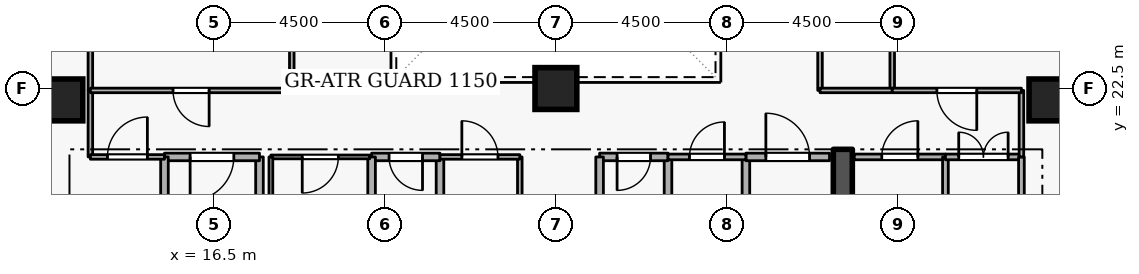
"""IFC4 building model, lengths in metres.
Left out: names, types, materials, properties, quantities, classifications, styles, units other than length and angle.
Written with IfcOpenShell. Run it as: python <this file> out.ifc"""

import sys

from ifc_helpers import new_model, si_unit, direction, frame, frame_2d, origin, origin_2d, place, context, subcontext, project, spatial, rectangle, extrude, element, fill, save


model = new_model("IFC4")
c1 = context("Model", 3, precision=1e-05, world=origin(), true_north=direction((0.0, 1.0)))
c2 = subcontext(c1, "Body", "Model", "MODEL_VIEW")
j1 = project(units=[si_unit("LENGTHUNIT", "METRE"), si_unit("PLANEANGLEUNIT", "RADIAN")], contexts=[c1])
p1 = place(None, origin())
s1 = spatial("IfcSite", under=j1, at=p1, CompositionType="ELEMENT")
p2 = place(p1, origin())
s2 = spatial("IfcBuilding", under=s1, at=p2, CompositionType="ELEMENT")
p3 = place(p2, frame((0.0, 0.0, 145.5)))
s3 = spatial("IfcBuildingStorey", under=s2, at=p3, CompositionType="ELEMENT", Elevation=145.5)
p4 = place(p3, frame((33.05, 15.1, 0.0), z_axis=(0.0, 0.0, 1.0), x_axis=(0.0, 1.0, 0.0)))
e1 = element("IfcWall", 1, at=p4, inside=s3, PredefinedType="SHEAR", context=c2, shape_type="SweptSolid", body=[
    extrude(rectangle(XDim=5.8, YDim=0.5, at=frame_2d((2.9, 0.0))), origin(), (0.0, 0.0, 1.0), 3.6),
])
for number, where, z_axis, x_axis in (
    (2, (12.5, 22.2, 0.0), (0.0, 0.0, 1.0), (1.0, 0.0, 0.0)),
    (3, (38.5, 22.2, 0.0), (0.0, 0.0, 1.0), (1.0, 0.0, 0.0)),
    (4, (25.5, 22.5, 0.0), (0.0, 0.0, 1.0), (1.0, 0.0, 0.0)),
):
    element("IfcColumn", number, at=place(p3, frame(where, z_axis=z_axis, x_axis=x_axis)), inside=s3, PredefinedType="COLUMN", context=c2, shape_type="SweptSolid", body=[
        extrude(rectangle(XDim=1.1, YDim=1.1, at=origin_2d()), origin(), (0.0, 0.0, 1.0), 3.6),
    ])
p5 = place(p3, frame((17.7, 18.4, 0.0), z_axis=(0.0, 0.0, 1.0), x_axis=(0.0, 1.0, 0.0)))
e5 = element("IfcWall", 5, at=p5, inside=s3, PredefinedType="STANDARD", context=c2, shape_type="SweptSolid", body=[
    extrude(rectangle(XDim=2.3, YDim=0.2, at=frame_2d((1.15, 0.0))), origin(), (0.0, 0.0, 1.0), 2.505),
])
p6 = place(p3, frame((17.7, 20.7, 0.0), z_axis=(0.0, 0.0, 1.0), x_axis=(-1.0, 0.0, 0.0)))
e6 = element("IfcWall", 6, at=p6, inside=s3, PredefinedType="STANDARD", context=c2, shape_type="SweptSolid", body=[
    extrude(rectangle(XDim=2.5, YDim=0.2, at=frame_2d((1.25, 0.0))), origin(), (0.0, 0.0, 1.0), 3.3),
])
p7 = place(p6, frame((0.675, 0.0, 0.0)))
e7 = element("IfcOpeningElement", 7, at=p7, cuts=e6, PredefinedType="OPENING", context=c2, shape_type="SweptSolid", body=[
    extrude(rectangle(XDim=1.15, YDim=2.1, at=frame_2d((0.575, 1.05))), frame((0.0, 0.11, 0.0), z_axis=(0.0, -1.0, 0.0), x_axis=(1.0, 0.0, 0.0)), (0.0, 0.0, 1.0), 0.22),
])
p8 = place(p3, frame((15.2, 20.7, 0.0), z_axis=(0.0, 0.0, 1.0), x_axis=(0.0, -1.0, 0.0)))
e8 = element("IfcWall", 8, at=p8, inside=s3, PredefinedType="STANDARD", context=c2, shape_type="SweptSolid", body=[
    extrude(rectangle(XDim=5.7, YDim=0.2, at=frame_2d((2.85, 0.0))), origin(), (0.0, 0.0, 1.0), 3.3),
])
p9 = place(p3, frame((28.45, 18.65, 0.0), z_axis=(0.0, 0.0, 1.0), x_axis=(0.0, 1.0, 0.0)))
e9 = element("IfcWall", 9, at=p9, inside=s3, PredefinedType="STANDARD", context=c2, shape_type="SweptSolid", body=[
    extrude(rectangle(XDim=2.05, YDim=0.2, at=frame_2d((1.025, 0.0))), origin(), (0.0, 0.0, 1.0), 3.3),
])
p10 = place(p3, frame((28.45, 20.7, 0.0), z_axis=(0.0, 0.0, 1.0), x_axis=(-1.0, 0.0, 0.0)))
e10 = element("IfcWall", 10, at=p10, inside=s3, PredefinedType="STANDARD", context=c2, shape_type="SweptSolid", body=[
    extrude(rectangle(XDim=1.8, YDim=0.2, at=frame_2d((0.9, 0.0))), origin(), (0.0, 0.0, 1.0), 3.3),
])
p11 = place(p10, frame((0.46, 0.0, 0.0)))
e11 = element("IfcOpeningElement", 11, at=p11, cuts=e10, PredefinedType="OPENING", context=c2, shape_type="SweptSolid", body=[
    extrude(rectangle(XDim=0.88, YDim=2.04, at=frame_2d((0.44, 1.02))), frame((0.0, 0.11, 0.0), z_axis=(0.0, -1.0, 0.0), x_axis=(1.0, 0.0, 0.0)), (0.0, 0.0, 1.0), 0.22),
])
for number, where, z_axis, x_axis in (
    (12, (26.65, 20.7, 0.0), (0.0, 0.0, 1.0), (0.0, -1.0, 0.0)),
    (13, (22.45, 18.65, 0.0), (0.0, 0.0, 1.0), (0.0, 1.0, 0.0)),
):
    element("IfcWall", number, at=place(p3, frame(where, z_axis=z_axis, x_axis=x_axis)), inside=s3, PredefinedType="STANDARD", context=c2, shape_type="SweptSolid", body=[
        extrude(rectangle(XDim=2.05, YDim=0.2, at=frame_2d((1.025, 0.0))), origin(), (0.0, 0.0, 1.0), 3.3),
    ])
p12 = place(p3, frame((22.45, 20.7, 0.0), z_axis=(0.0, 0.0, 1.0), x_axis=(-1.0, 0.0, 0.0)))
e14 = element("IfcWall", 14, at=p12, inside=s3, PredefinedType="STANDARD", context=c2, shape_type="SweptSolid", body=[
    extrude(rectangle(XDim=1.8, YDim=0.2, at=frame_2d((0.9, 0.0))), origin(), (0.0, 0.0, 1.0), 3.3),
])
p13 = place(p12, frame((0.46, 0.0, 0.0)))
e15 = element("IfcOpeningElement", 15, at=p13, cuts=e14, PredefinedType="OPENING", context=c2, shape_type="SweptSolid", body=[
    extrude(rectangle(XDim=0.88, YDim=2.04, at=frame_2d((0.44, 1.02))), frame((0.0, 0.11, 0.0), z_axis=(0.0, -1.0, 0.0), x_axis=(1.0, 0.0, 0.0)), (0.0, 0.0, 1.0), 0.22),
])
for number, where, z_axis, x_axis in (
    (16, (20.65, 20.7, 0.0), (0.0, 0.0, 1.0), (0.0, -1.0, 0.0)),
    (17, (30.5, 18.65, 0.0), (0.0, 0.0, 1.0), (0.0, 1.0, 0.0)),
):
    element("IfcWall", number, at=place(p3, frame(where, z_axis=z_axis, x_axis=x_axis)), inside=s3, PredefinedType="STANDARD", context=c2, shape_type="SweptSolid", body=[
        extrude(rectangle(XDim=2.05, YDim=0.2, at=frame_2d((1.025, 0.0))), origin(), (0.0, 0.0, 1.0), 3.3),
    ])
p14 = place(p3, frame((30.5, 20.7, 0.0), z_axis=(0.0, 0.0, 1.0), x_axis=(1.0, 0.0, 0.0)))
e18 = element("IfcWall", 18, at=p14, inside=s3, PredefinedType="STANDARD", context=c2, shape_type="SweptSolid", body=[
    extrude(rectangle(XDim=2.2, YDim=0.2, at=frame_2d((1.1, 0.0))), origin(), (0.0, 0.0, 1.0), 3.3),
])
p15 = place(p14, frame((0.525, 0.0, 0.0)))
e19 = element("IfcOpeningElement", 19, at=p15, cuts=e18, PredefinedType="OPENING", context=c2, shape_type="SweptSolid", body=[
    extrude(rectangle(XDim=1.15, YDim=2.1, at=frame_2d((0.575, 1.05))), frame((0.0, 0.11, 0.0), z_axis=(0.0, -1.0, 0.0), x_axis=(1.0, 0.0, 0.0)), (0.0, 0.0, 1.0), 0.22),
])
p16 = place(p3, frame((20.6, 20.7, 0.0), z_axis=(0.0, 0.0, 1.0), x_axis=(-1.0, 0.0, 0.0)))
e20 = element("IfcWall", 20, at=p16, inside=s3, PredefinedType="PARTITIONING", context=c2, shape_type="SweptSolid", body=[
    extrude(rectangle(XDim=2.6, YDim=0.1, at=frame_2d((1.3, 0.0))), origin(), (0.0, 0.0, 1.0), 3.3),
])
p17 = place(p16, frame((0.825, 0.0, 0.0)))
e21 = element("IfcOpeningElement", 21, at=p17, cuts=e20, PredefinedType="OPENING", context=c2, shape_type="SweptSolid", body=[
    extrude(rectangle(XDim=0.95, YDim=2.1, at=frame_2d((0.475, 1.05))), frame((0.0, 0.06, 0.0), z_axis=(0.0, -1.0, 0.0), x_axis=(1.0, 0.0, 0.0)), (0.0, 0.0, 1.0), 0.12),
])
p18 = place(p3, frame((18.0, 20.7, 0.0), z_axis=(0.0, 0.0, 1.0), x_axis=(0.0, -1.0, 0.0)))
e22 = element("IfcWall", 22, at=p18, inside=s3, PredefinedType="PARTITIONING", context=c2, shape_type="SweptSolid", body=[
    extrude(rectangle(XDim=2.05, YDim=0.1, at=frame_2d((1.025, 0.0))), origin(), (0.0, 0.0, 1.0), 2.505),
])
p19 = place(p3, frame((24.55, 20.7, 0.0), z_axis=(0.0, 0.0, 1.0), x_axis=(0.0, -1.0, 0.0)))
e23 = element("IfcWall", 23, at=p19, inside=s3, PredefinedType="PARTITIONING", context=c2, shape_type="SweptSolid", body=[
    extrude(rectangle(XDim=2.05, YDim=0.12, at=frame_2d((1.025, 0.0))), origin(), (0.0, 0.0, 1.0), 3.3),
])
p20 = place(p3, frame((22.45, 20.7, 0.0), z_axis=(0.0, 0.0, 1.0), x_axis=(1.0, 0.0, 0.0)))
e24 = element("IfcWall", 24, at=p20, inside=s3, PredefinedType="PARTITIONING", context=c2, shape_type="SweptSolid", body=[
    extrude(rectangle(XDim=2.1, YDim=0.12, at=frame_2d((1.05, 0.0))), origin(), (0.0, 0.0, 1.0), 3.3),
])
p21 = place(p20, frame((0.575, 0.0, 0.0)))
e25 = element("IfcOpeningElement", 25, at=p21, cuts=e24, PredefinedType="OPENING", context=c2, shape_type="SweptSolid", body=[
    extrude(rectangle(XDim=0.95, YDim=2.1, at=frame_2d((0.475, 1.05))), frame((0.0, 0.07, 0.0), z_axis=(0.0, -1.0, 0.0), x_axis=(1.0, 0.0, 0.0)), (0.0, 0.0, 1.0), 0.14),
])
p22 = place(p3, frame((28.45, 20.7, 0.0), z_axis=(0.0, 0.0, 1.0), x_axis=(1.0, 0.0, 0.0)))
e26 = element("IfcWall", 26, at=p22, inside=s3, PredefinedType="PARTITIONING", context=c2, shape_type="SweptSolid", body=[
    extrude(rectangle(XDim=2.05, YDim=0.15, at=frame_2d((1.025, 0.0))), origin(), (0.0, 0.0, 1.0), 3.3),
])
p23 = place(p22, frame((0.565, 0.0, 0.0)))
e27 = element("IfcOpeningElement", 27, at=p23, cuts=e26, PredefinedType="OPENING", context=c2, shape_type="SweptSolid", body=[
    extrude(rectangle(XDim=0.92, YDim=2.08, at=frame_2d((0.46, 1.04))), frame((0.0, 0.085, 0.0), z_axis=(0.0, -1.0, 0.0), x_axis=(1.0, 0.0, 0.0)), (0.0, 0.0, 1.0), 0.17),
])
p24 = place(p3, frame((33.35, 20.7, 0.0), z_axis=(0.0, 0.0, 1.0), x_axis=(1.0, 0.0, 0.0)))
e28 = element("IfcWall", 28, at=p24, inside=s3, PredefinedType="PARTITIONING", context=c2, shape_type="SweptSolid", body=[
    extrude(rectangle(XDim=2.4, YDim=0.15, at=frame_2d((1.2, 0.0))), origin(), (0.0, 0.0, 1.0), 3.3),
])
p25 = place(p24, frame((0.725, 0.0, 0.0)))
e29 = element("IfcOpeningElement", 29, at=p25, cuts=e28, PredefinedType="OPENING", context=c2, shape_type="SweptSolid", body=[
    extrude(rectangle(XDim=0.95, YDim=2.1, at=frame_2d((0.475, 1.05))), frame((0.0, 0.085, 0.0), z_axis=(0.0, -1.0, 0.0), x_axis=(1.0, 0.0, 0.0)), (0.0, 0.0, 1.0), 0.17),
])
p26 = place(p3, frame((35.75, 20.7, 0.0), z_axis=(0.0, 0.0, 1.0), x_axis=(0.0, -1.0, 0.0)))
e30 = element("IfcWall", 30, at=p26, inside=s3, PredefinedType="PARTITIONING", context=c2, shape_type="SweptSolid", body=[
    extrude(rectangle(XDim=5.65, YDim=0.15, at=frame_2d((2.825, 0.0))), origin(), (0.0, 0.0, 1.0), 3.3),
])
p27 = place(p3, frame((35.75, 20.7, 0.0), z_axis=(0.0, 0.0, 1.0), x_axis=(1.0, 0.0, 0.0)))
e31 = element("IfcWall", 31, at=p27, inside=s3, PredefinedType="PARTITIONING", context=c2, shape_type="SweptSolid", body=[
    extrude(rectangle(XDim=2.0, YDim=0.15, at=frame_2d((1.0, 0.0))), origin(), (0.0, 0.0, 1.0), 3.3),
])
p28 = place(p27, frame((0.35, 0.0, 0.0)))
e32 = element("IfcOpeningElement", 32, at=p28, cuts=e31, PredefinedType="OPENING", context=c2, shape_type="SweptSolid", body=[
    extrude(rectangle(XDim=1.3, YDim=2.12, at=frame_2d((0.65, 1.06))), frame((0.0, 0.085, 0.0), z_axis=(0.0, -1.0, 0.0), x_axis=(1.0, 0.0, 0.0)), (0.0, 0.0, 1.0), 0.17),
])
p29 = place(p3, frame((37.75, 20.7, 0.0), z_axis=(0.0, 0.0, 1.0), x_axis=(0.0, -1.0, 0.0)))
e33 = element("IfcWall", 33, at=p29, inside=s3, PredefinedType="PARTITIONING", context=c2, shape_type="SweptSolid", body=[
    extrude(rectangle(XDim=5.65, YDim=0.15, at=frame_2d((2.825, 0.0))), origin(), (0.0, 0.0, 1.0), 3.3),
])
p30 = place(p3, frame((13.25, 22.45, 0.0), z_axis=(0.0, 0.0, 1.0), x_axis=(0.0, -1.0, 0.0)))
e34 = element("IfcWall", 34, at=p30, inside=s3, PredefinedType="PARTITIONING", context=c2, shape_type="SweptSolid", body=[
    extrude(rectangle(XDim=1.75, YDim=0.12, at=frame_2d((0.875, 0.0))), origin(), (0.0, 0.0, 1.0), 3.3),
])
p31 = place(p3, frame((13.25, 20.7, 0.0), z_axis=(0.0, 0.0, 1.0), x_axis=(1.0, 0.0, 0.0)))
e35 = element("IfcWall", 35, at=p31, inside=s3, PredefinedType="PARTITIONING", context=c2, shape_type="SweptSolid", body=[
    extrude(rectangle(XDim=1.95, YDim=0.12, at=frame_2d((0.975, 0.0))), origin(), (0.0, 0.0, 1.0), 3.3),
])
p32 = place(p31, frame((0.45, 0.0, 0.0)))
e36 = element("IfcOpeningElement", 36, at=p32, cuts=e35, PredefinedType="OPENING", context=c2, shape_type="SweptSolid", body=[
    extrude(rectangle(XDim=1.05, YDim=2.1, at=frame_2d((0.525, 1.05))), frame((0.0, 0.07, 0.0), z_axis=(0.0, -1.0, 0.0), x_axis=(1.0, 0.0, 0.0)), (0.0, 0.0, 1.0), 0.14),
])
for number, where, z_axis, x_axis in (
    (37, (13.25, 27.0, 0.0), (0.0, 0.0, 1.0), (0.0, -1.0, 0.0)),
    (38, (18.55, 27.0, 0.0), (0.0, 0.0, 1.0), (0.0, -1.0, 0.0)),
):
    element("IfcWall", number, at=place(p3, frame(where, z_axis=z_axis, x_axis=x_axis)), inside=s3, PredefinedType="PARTITIONING", context=c2, shape_type="SweptSolid", body=[
        extrude(rectangle(XDim=4.55, YDim=0.12, at=frame_2d((2.275, 0.0))), origin(), (0.0, 0.0, 1.0), 3.3),
    ])
p33 = place(p3, frame((18.55, 22.45, 0.0), z_axis=(0.0, 0.0, 1.0), x_axis=(-1.0, 0.0, 0.0)))
e39 = element("IfcWall", 39, at=p33, inside=s3, PredefinedType="PARTITIONING", context=c2, shape_type="SweptSolid", body=[
    extrude(rectangle(XDim=5.3, YDim=0.12, at=frame_2d((2.65, 0.0))), origin(), (0.0, 0.0, 1.0), 3.3),
])
p34 = place(p33, frame((2.175, 0.0, 0.0)))
e40 = element("IfcOpeningElement", 40, at=p34, cuts=e39, PredefinedType="OPENING", context=c2, shape_type="SweptSolid", body=[
    extrude(rectangle(XDim=0.95, YDim=2.1, at=frame_2d((0.475, 1.05))), frame((0.0, 0.07, 0.0), z_axis=(0.0, -1.0, 0.0), x_axis=(1.0, 0.0, 0.0)), (0.0, 0.0, 1.0), 0.14),
])
p35 = place(p3, frame((32.45, 22.45, 0.0), z_axis=(0.0, 0.0, 1.0), x_axis=(0.0, 1.0, 0.0)))
e41 = element("IfcWall", 41, at=p35, inside=s3, PredefinedType="PARTITIONING", context=c2, shape_type="SweptSolid", body=[
    extrude(rectangle(XDim=4.55, YDim=0.12, at=frame_2d((2.275, 0.0))), origin(), (0.0, 0.0, 1.0), 3.3),
])
p36 = place(p35, frame((1.8, 0.0, 0.0)))
e42 = element("IfcOpeningElement", 42, at=p36, cuts=e41, PredefinedType="OPENING", context=c2, shape_type="SweptSolid", body=[
    extrude(rectangle(XDim=0.95, YDim=2.1, at=frame_2d((0.475, 1.05))), frame((0.0, 0.07, 0.0), z_axis=(0.0, -1.0, 0.0), x_axis=(1.0, 0.0, 0.0)), (0.0, 0.0, 1.0), 0.14),
])
p37 = place(p3, frame((34.35, 27.0, 0.0), z_axis=(0.0, 0.0, 1.0), x_axis=(0.0, -1.0, 0.0)))
e43 = element("IfcWall", 43, at=p37, inside=s3, PredefinedType="PARTITIONING", context=c2, shape_type="SweptSolid", body=[
    extrude(rectangle(XDim=4.55, YDim=0.12, at=frame_2d((2.275, 0.0))), origin(), (0.0, 0.0, 1.0), 3.3),
])
p38 = place(p3, frame((34.35, 22.45, 0.0), z_axis=(0.0, 0.0, 1.0), x_axis=(-1.0, 0.0, 0.0)))
e44 = element("IfcWall", 44, at=p38, inside=s3, PredefinedType="PARTITIONING", context=c2, shape_type="SweptSolid", body=[
    extrude(rectangle(XDim=1.9, YDim=0.12, at=frame_2d((0.95, 0.0))), origin(), (0.0, 0.0, 1.0), 3.3),
])
p39 = place(p3, frame((37.75, 20.7, 0.0), z_axis=(0.0, 0.0, 1.0), x_axis=(0.0, 1.0, 0.0)))
e45 = element("IfcWall", 45, at=p39, inside=s3, PredefinedType="PARTITIONING", context=c2, shape_type="SweptSolid", body=[
    extrude(rectangle(XDim=1.75, YDim=0.12, at=frame_2d((0.875, 0.0))), origin(), (0.0, 0.0, 1.0), 3.3),
])
p40 = place(p3, frame((37.75, 22.45, 0.0), z_axis=(0.0, 0.0, 1.0), x_axis=(-1.0, 0.0, 0.0)))
e46 = element("IfcWall", 46, at=p40, inside=s3, PredefinedType="PARTITIONING", context=c2, shape_type="SweptSolid", body=[
    extrude(rectangle(XDim=3.4, YDim=0.12, at=frame_2d((1.7, 0.0))), origin(), (0.0, 0.0, 1.0), 3.3),
])
p41 = place(p40, frame((1.175, 0.0, 0.0)))
e47 = element("IfcOpeningElement", 47, at=p41, cuts=e46, PredefinedType="OPENING", context=c2, shape_type="SweptSolid", body=[
    extrude(rectangle(XDim=1.05, YDim=2.1, at=frame_2d((0.525, 1.05))), frame((0.0, 0.07, 0.0), z_axis=(0.0, -1.0, 0.0), x_axis=(1.0, 0.0, 0.0)), (0.0, 0.0, 1.0), 0.14),
])
p42 = place(p7, origin())
e48 = element("IfcDoor", 48, at=p42, inside=s3, OperationType="SINGLE_SWING_RIGHT", PredefinedType="DOOR", context=c2, shape_type="SweptSolid", body=[
    extrude(rectangle(XDim=1.15, YDim=2.1, at=frame_2d((0.575, 1.05))), frame((0.0, 0.025, 0.0), z_axis=(0.0, -1.0, 0.0), x_axis=(1.0, 0.0, 0.0)), (0.0, 0.0, 1.0), 0.05),
])
fill(e7, e48)
p43 = place(p11, origin())
e49 = element("IfcDoor", 49, at=p43, inside=s3, OperationType="SINGLE_SWING_RIGHT", PredefinedType="DOOR", context=c2, shape_type="SweptSolid", body=[
    extrude(rectangle(XDim=0.88, YDim=2.04, at=frame_2d((0.44, 1.02))), frame((0.0, 0.025, 0.0), z_axis=(0.0, -1.0, 0.0), x_axis=(1.0, 0.0, 0.0)), (0.0, 0.0, 1.0), 0.05),
])
fill(e11, e49)
p44 = place(p13, origin())
e50 = element("IfcDoor", 50, at=p44, inside=s3, OperationType="SINGLE_SWING_LEFT", PredefinedType="DOOR", context=c2, shape_type="SweptSolid", body=[
    extrude(rectangle(XDim=0.88, YDim=2.04, at=frame_2d((0.44, 1.02))), frame((0.0, 0.025, 0.0), z_axis=(0.0, -1.0, 0.0), x_axis=(1.0, 0.0, 0.0)), (0.0, 0.0, 1.0), 0.05),
])
fill(e15, e50)
p45 = place(p17, origin())
e51 = element("IfcDoor", 51, at=p45, inside=s3, OperationType="SINGLE_SWING_RIGHT", PredefinedType="DOOR", context=c2, shape_type="SweptSolid", body=[
    extrude(rectangle(XDim=0.95, YDim=2.1, at=frame_2d((0.475, 1.05))), frame((0.0, 0.025, 0.0), z_axis=(0.0, -1.0, 0.0), x_axis=(1.0, 0.0, 0.0)), (0.0, 0.0, 1.0), 0.05),
])
fill(e21, e51)
p46 = place(p21, origin())
e52 = element("IfcDoor", 52, at=p46, inside=s3, OperationType="SINGLE_SWING_LEFT", PredefinedType="DOOR", context=c2, shape_type="SweptSolid", body=[
    extrude(rectangle(XDim=0.95, YDim=2.1, at=frame_2d((0.475, 1.05))), frame((0.0, 0.025, 0.0), z_axis=(0.0, -1.0, 0.0), x_axis=(1.0, 0.0, 0.0)), (0.0, 0.0, 1.0), 0.05),
])
fill(e25, e52)
p47 = place(p23, origin())
e53 = element("IfcDoor", 53, at=p47, inside=s3, OperationType="SINGLE_SWING_RIGHT", PredefinedType="DOOR", context=c2, shape_type="SweptSolid", body=[
    extrude(rectangle(XDim=0.92, YDim=2.08, at=frame_2d((0.46, 1.04))), frame((0.0, 0.025, 0.0), z_axis=(0.0, -1.0, 0.0), x_axis=(1.0, 0.0, 0.0)), (0.0, 0.0, 1.0), 0.05),
])
fill(e27, e53)
p48 = place(p15, origin())
e54 = element("IfcDoor", 54, at=p48, inside=s3, OperationType="SINGLE_SWING_LEFT", PredefinedType="DOOR", context=c2, shape_type="SweptSolid", body=[
    extrude(rectangle(XDim=1.15, YDim=2.1, at=frame_2d((0.575, 1.05))), frame((0.0, 0.025, 0.0), z_axis=(0.0, -1.0, 0.0), x_axis=(1.0, 0.0, 0.0)), (0.0, 0.0, 1.0), 0.05),
])
fill(e19, e54)
p49 = place(p25, origin())
e55 = element("IfcDoor", 55, at=p49, inside=s3, OperationType="SINGLE_SWING_RIGHT", PredefinedType="DOOR", context=c2, shape_type="SweptSolid", body=[
    extrude(rectangle(XDim=0.95, YDim=2.1, at=frame_2d((0.475, 1.05))), frame((0.0, 0.025, 0.0), z_axis=(0.0, -1.0, 0.0), x_axis=(1.0, 0.0, 0.0)), (0.0, 0.0, 1.0), 0.05),
])
fill(e29, e55)
p50 = place(p28, origin())
e56 = element("IfcDoor", 56, at=p50, inside=s3, OperationType="DOUBLE_DOOR_SINGLE_SWING", PredefinedType="DOOR", context=c2, shape_type="SweptSolid", body=[
    extrude(rectangle(XDim=1.3, YDim=2.12, at=frame_2d((0.65, 1.06))), frame((0.0, 0.025, 0.0), z_axis=(0.0, -1.0, 0.0), x_axis=(1.0, 0.0, 0.0)), (0.0, 0.0, 1.0), 0.05),
])
fill(e32, e56)
p51 = place(p32, origin())
e57 = element("IfcDoor", 57, at=p51, inside=s3, OperationType="SINGLE_SWING_RIGHT", PredefinedType="DOOR", context=c2, shape_type="SweptSolid", body=[
    extrude(rectangle(XDim=1.05, YDim=2.1, at=frame_2d((0.525, 1.05))), frame((0.0, 0.025, 0.0), z_axis=(0.0, -1.0, 0.0), x_axis=(1.0, 0.0, 0.0)), (0.0, 0.0, 1.0), 0.05),
])
fill(e36, e57)
p52 = place(p34, origin())
e58 = element("IfcDoor", 58, at=p52, inside=s3, OperationType="SINGLE_SWING_LEFT", PredefinedType="DOOR", context=c2, shape_type="SweptSolid", body=[
    extrude(rectangle(XDim=0.95, YDim=2.1, at=frame_2d((0.475, 1.05))), frame((0.0, 0.025, 0.0), z_axis=(0.0, -1.0, 0.0), x_axis=(1.0, 0.0, 0.0)), (0.0, 0.0, 1.0), 0.05),
])
fill(e40, e58)
p53 = place(p41, origin())
e59 = element("IfcDoor", 59, at=p53, inside=s3, OperationType="SINGLE_SWING_LEFT", PredefinedType="DOOR", context=c2, shape_type="SweptSolid", body=[
    extrude(rectangle(XDim=1.05, YDim=2.1, at=frame_2d((0.525, 1.05))), frame((0.0, 0.025, 0.0), z_axis=(0.0, -1.0, 0.0), x_axis=(1.0, 0.0, 0.0)), (0.0, 0.0, 1.0), 0.05),
])
fill(e47, e59)
save(model, sys.argv[1])
